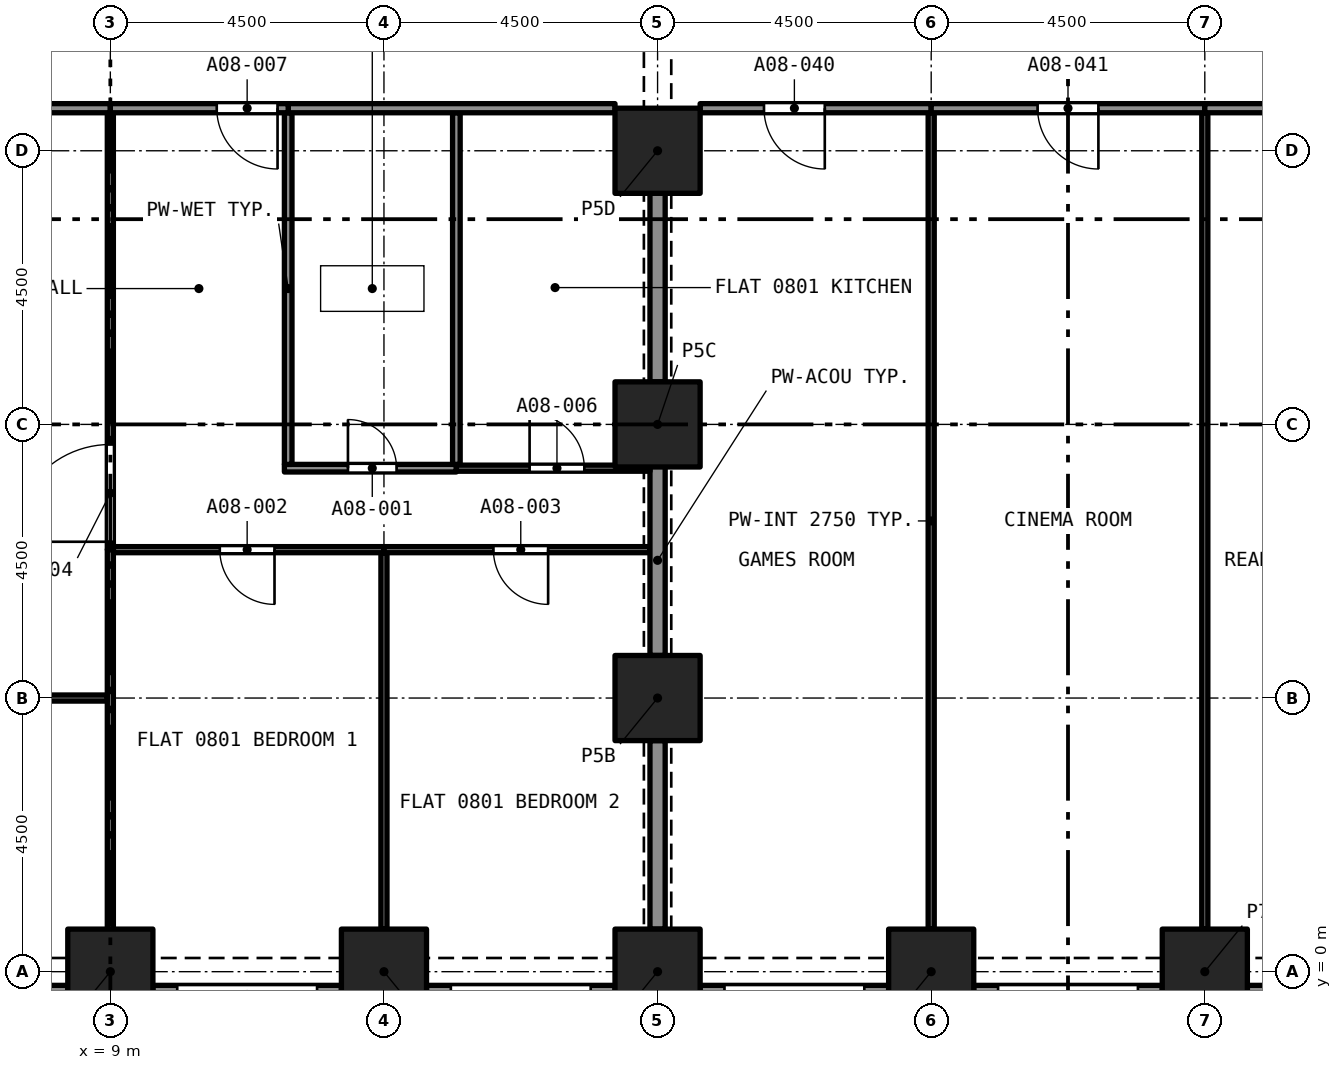
"""IFC4 building model, lengths in metres.
Left out: names, types, materials, properties, quantities, classifications, styles, units other than length and angle.
Written with IfcOpenShell. Run it as: python <this file> out.ifc"""

import sys

from ifc_helpers import new_model, si_unit, direction, frame, frame_2d, origin, origin_2d, place, context, subcontext, project, spatial, rectangle, extrude, element, fill, save


model = new_model("IFC4")
c1 = context("Model", 3, precision=1e-05, world=origin(), true_north=direction((0.0, 1.0)))
c2 = subcontext(c1, "Body", "Model", "MODEL_VIEW")
j1 = project(units=[si_unit("LENGTHUNIT", "METRE"), si_unit("PLANEANGLEUNIT", "RADIAN")], contexts=[c1])
p1 = place(None, origin())
s1 = spatial("IfcSite", under=j1, at=p1, CompositionType="ELEMENT")
p2 = place(p1, origin())
s2 = spatial("IfcBuilding", under=s1, at=p2, CompositionType="ELEMENT")
p3 = place(p2, frame((0.0, 0.0, 36.8)))
s3 = spatial("IfcBuildingStorey", under=s2, at=p3, CompositionType="ELEMENT", Elevation=36.8)
for number, where, z_axis, x_axis in (
    (1, (9.0, 0.0, 0.0), (0.0, 0.0, 1.0), (1.0, 0.0, 0.0)),
    (2, (13.5, 0.0, 0.0), (0.0, 0.0, 1.0), (1.0, 0.0, 0.0)),
    (3, (18.0, 0.0, 0.0), (0.0, 0.0, 1.0), (1.0, 0.0, 0.0)),
    (4, (22.5, 0.0, 0.0), (0.0, 0.0, 1.0), (1.0, 0.0, 0.0)),
    (5, (27.0, 0.0, 0.0), (0.0, 0.0, 1.0), (1.0, 0.0, 0.0)),
    (6, (18.0, 4.5, 0.0), (0.0, 0.0, 1.0), (1.0, 0.0, 0.0)),
    (7, (18.0, 9.0, 0.0), (0.0, 0.0, 1.0), (1.0, 0.0, 0.0)),
    (8, (18.0, 13.5, 0.0), (0.0, 0.0, 1.0), (1.0, 0.0, 0.0)),
):
    element("IfcColumn", number, at=place(p3, frame(where, z_axis=z_axis, x_axis=x_axis)), inside=s3, PredefinedType="COLUMN", context=c2, shape_type="SweptSolid", body=[
        extrude(rectangle(XDim=1.4, YDim=1.4, at=origin_2d()), origin(), (0.0, 0.0, 1.0), 3.2),
    ])
p4 = place(p3, frame((8.3, -0.375, 0.0), z_axis=(0.0, 0.0, 1.0), x_axis=(-1.0, 0.0, 0.0)))
e9 = element("IfcWall", 9, at=p4, inside=s3, PredefinedType="SOLIDWALL", context=c2, shape_type="SweptSolid", body=[
    extrude(rectangle(XDim=3.1, YDim=0.3, at=frame_2d((1.55, 0.0))), origin(), (0.0, 0.0, 1.0), 3.2),
])
p5 = place(p4, frame((0.4, 0.0, 0.45)))
e10 = element("IfcOpeningElement", 10, at=p5, cuts=e9, PredefinedType="OPENING", context=c2, shape_type="SweptSolid", body=[
    extrude(rectangle(XDim=2.3, YDim=1.95, at=frame_2d((1.15, 0.975))), frame((0.0, 0.16, 0.0), z_axis=(0.0, -1.0, 0.0), x_axis=(1.0, 0.0, 0.0)), (0.0, 0.0, 1.0), 0.32),
])
p6 = place(p3, frame((12.8, -0.375, 0.0), z_axis=(0.0, 0.0, 1.0), x_axis=(-1.0, 0.0, 0.0)))
e11 = element("IfcWall", 11, at=p6, inside=s3, PredefinedType="SOLIDWALL", context=c2, shape_type="SweptSolid", body=[
    extrude(rectangle(XDim=3.1, YDim=0.3, at=frame_2d((1.55, 0.0))), origin(), (0.0, 0.0, 1.0), 3.2),
])
p7 = place(p6, frame((0.4, 0.0, 0.45)))
e12 = element("IfcOpeningElement", 12, at=p7, cuts=e11, PredefinedType="OPENING", context=c2, shape_type="SweptSolid", body=[
    extrude(rectangle(XDim=2.3, YDim=1.95, at=frame_2d((1.15, 0.975))), frame((0.0, 0.16, 0.0), z_axis=(0.0, -1.0, 0.0), x_axis=(1.0, 0.0, 0.0)), (0.0, 0.0, 1.0), 0.32),
])
p8 = place(p3, frame((17.3, -0.375, 0.0), z_axis=(0.0, 0.0, 1.0), x_axis=(-1.0, 0.0, 0.0)))
e13 = element("IfcWall", 13, at=p8, inside=s3, PredefinedType="SOLIDWALL", context=c2, shape_type="SweptSolid", body=[
    extrude(rectangle(XDim=3.1, YDim=0.3, at=frame_2d((1.55, 0.0))), origin(), (0.0, 0.0, 1.0), 3.2),
])
p9 = place(p8, frame((0.4, 0.0, 0.45)))
e14 = element("IfcOpeningElement", 14, at=p9, cuts=e13, PredefinedType="OPENING", context=c2, shape_type="SweptSolid", body=[
    extrude(rectangle(XDim=2.3, YDim=1.95, at=frame_2d((1.15, 0.975))), frame((0.0, 0.16, 0.0), z_axis=(0.0, -1.0, 0.0), x_axis=(1.0, 0.0, 0.0)), (0.0, 0.0, 1.0), 0.32),
])
p10 = place(p3, frame((21.8, -0.375, 0.0), z_axis=(0.0, 0.0, 1.0), x_axis=(-1.0, 0.0, 0.0)))
e15 = element("IfcWall", 15, at=p10, inside=s3, PredefinedType="SOLIDWALL", context=c2, shape_type="SweptSolid", body=[
    extrude(rectangle(XDim=3.1, YDim=0.3, at=frame_2d((1.55, 0.0))), origin(), (0.0, 0.0, 1.0), 3.2),
])
p11 = place(p10, frame((0.4, 0.0, 0.45)))
e16 = element("IfcOpeningElement", 16, at=p11, cuts=e15, PredefinedType="OPENING", context=c2, shape_type="SweptSolid", body=[
    extrude(rectangle(XDim=2.3, YDim=1.95, at=frame_2d((1.15, 0.975))), frame((0.0, 0.16, 0.0), z_axis=(0.0, -1.0, 0.0), x_axis=(1.0, 0.0, 0.0)), (0.0, 0.0, 1.0), 0.32),
])
p12 = place(p3, frame((26.3, -0.375, 0.0), z_axis=(0.0, 0.0, 1.0), x_axis=(-1.0, 0.0, 0.0)))
e17 = element("IfcWall", 17, at=p12, inside=s3, PredefinedType="SOLIDWALL", context=c2, shape_type="SweptSolid", body=[
    extrude(rectangle(XDim=3.1, YDim=0.3, at=frame_2d((1.55, 0.0))), origin(), (0.0, 0.0, 1.0), 3.2),
])
p13 = place(p12, frame((0.4, 0.0, 0.45)))
e18 = element("IfcOpeningElement", 18, at=p13, cuts=e17, PredefinedType="OPENING", context=c2, shape_type="SweptSolid", body=[
    extrude(rectangle(XDim=2.3, YDim=1.95, at=frame_2d((1.15, 0.975))), frame((0.0, 0.16, 0.0), z_axis=(0.0, -1.0, 0.0), x_axis=(1.0, 0.0, 0.0)), (0.0, 0.0, 1.0), 0.32),
])
p14 = place(p3, frame((30.8, -0.375, 0.0), z_axis=(0.0, 0.0, 1.0), x_axis=(-1.0, 0.0, 0.0)))
e19 = element("IfcWall", 19, at=p14, inside=s3, PredefinedType="SOLIDWALL", context=c2, shape_type="SweptSolid", body=[
    extrude(rectangle(XDim=3.1, YDim=0.3, at=frame_2d((1.55, 0.0))), origin(), (0.0, 0.0, 1.0), 3.2),
])
p15 = place(p14, frame((0.4, 0.0, 0.45)))
e20 = element("IfcOpeningElement", 20, at=p15, cuts=e19, PredefinedType="OPENING", context=c2, shape_type="SweptSolid", body=[
    extrude(rectangle(XDim=2.3, YDim=1.95, at=frame_2d((1.15, 0.975))), frame((0.0, 0.16, 0.0), z_axis=(0.0, -1.0, 0.0), x_axis=(1.0, 0.0, 0.0)), (0.0, 0.0, 1.0), 0.32),
])
p16 = place(p3, frame((11.863, 8.28, 0.0), z_axis=(0.0, 0.0, 1.0), x_axis=(1.0, 0.0, 0.0)))
e21 = element("IfcWall", 21, at=p16, inside=s3, PredefinedType="PARTITIONING", context=c2, shape_type="SweptSolid", body=[
    extrude(rectangle(XDim=2.828, YDim=0.125, at=frame_2d((1.414, 0.0))), origin(), (0.0, 0.0, 1.0), 2.9),
])
p17 = place(p16, frame((1.045, 0.0, 0.0)))
e22 = element("IfcOpeningElement", 22, at=p17, cuts=e21, PredefinedType="OPENING", context=c2, shape_type="SweptSolid", body=[
    extrude(rectangle(XDim=0.8, YDim=2.1, at=frame_2d((0.4, 1.05))), frame((0.0, 0.073, 0.0), z_axis=(0.0, -1.0, 0.0), x_axis=(1.0, 0.0, 0.0)), (0.0, 0.0, 1.0), 0.145),
])
for number, where, z_axis, x_axis in (
    (23, (11.925, 8.343, 0.0), (0.0, 0.0, 1.0), (0.0, 1.0, 0.0)),
    (24, (14.691, 8.343, 0.0), (0.0, 0.0, 1.0), (0.0, 1.0, 0.0)),
):
    element("IfcWall", number, at=place(p3, frame(where, z_axis=z_axis, x_axis=x_axis)), inside=s3, PredefinedType="PARTITIONING", context=c2, shape_type="SweptSolid", body=[
        extrude(rectangle(XDim=5.782, YDim=0.125, at=frame_2d((2.891, 0.0))), origin(), (0.0, 0.0, 1.0), 2.9),
    ])
p18 = place(p3, frame((11.925, 14.2, 0.0), z_axis=(0.0, 0.0, 1.0), x_axis=(1.0, 0.0, 0.0)))
e25 = element("IfcWall", 25, at=p18, inside=s3, PredefinedType="PARTITIONING", context=c2, shape_type="SweptSolid", body=[
    extrude(rectangle(XDim=5.375, YDim=0.15, at=frame_2d((2.688, 0.0))), origin(), (0.0, 0.0, 1.0), 2.9),
])
p19 = place(p3, frame((13.5, 0.7, 0.0), z_axis=(0.0, 0.0, 1.0), x_axis=(0.0, 1.0, 0.0)))
e26 = element("IfcWall", 26, at=p19, inside=s3, PredefinedType="PARTITIONING", context=c2, shape_type="SweptSolid", body=[
    extrude(rectangle(XDim=6.19, YDim=0.1, at=frame_2d((3.095, 0.0))), origin(), (0.0, 0.0, 1.0), 2.9),
])
p20 = place(p3, frame((13.5, 6.94, 0.0), z_axis=(0.0, 0.0, 1.0), x_axis=(-1.0, 0.0, 0.0)))
e27 = element("IfcWall", 27, at=p20, inside=s3, PredefinedType="PARTITIONING", context=c2, shape_type="SweptSolid", body=[
    extrude(rectangle(XDim=4.45, YDim=0.1, at=frame_2d((2.225, 0.0))), origin(), (0.0, 0.0, 1.0), 2.9),
])
p21 = place(p20, frame((1.8, 0.0, 0.0)))
e28 = element("IfcOpeningElement", 28, at=p21, cuts=e27, PredefinedType="OPENING", context=c2, shape_type="SweptSolid", body=[
    extrude(rectangle(XDim=0.9, YDim=2.1, at=frame_2d((0.45, 1.05))), frame((0.0, 0.06, 0.0), z_axis=(0.0, -1.0, 0.0), x_axis=(1.0, 0.0, 0.0)), (0.0, 0.0, 1.0), 0.12),
])
p22 = place(p3, frame((9.0, 0.7, 0.0), z_axis=(0.0, 0.0, 1.0), x_axis=(0.0, 1.0, 0.0)))
e29 = element("IfcWall", 29, at=p22, inside=s3, PredefinedType="PARTITIONING", context=c2, shape_type="SweptSolid", body=[
    extrude(rectangle(XDim=6.24, YDim=0.1, at=frame_2d((3.12, 0.0))), origin(), (0.0, 0.0, 1.0), 2.9),
])
p23 = place(p3, frame((17.875, 6.94, 0.0), z_axis=(0.0, 0.0, 1.0), x_axis=(-1.0, 0.0, 0.0)))
e30 = element("IfcWall", 30, at=p23, inside=s3, PredefinedType="PARTITIONING", context=c2, shape_type="SweptSolid", body=[
    extrude(rectangle(XDim=4.375, YDim=0.1, at=frame_2d((2.188, 0.0))), origin(), (0.0, 0.0, 1.0), 2.9),
])
p24 = place(p23, frame((1.675, 0.0, 0.0)))
e31 = element("IfcOpeningElement", 31, at=p24, cuts=e30, PredefinedType="OPENING", context=c2, shape_type="SweptSolid", body=[
    extrude(rectangle(XDim=0.9, YDim=2.1, at=frame_2d((0.45, 1.05))), frame((0.0, 0.06, 0.0), z_axis=(0.0, -1.0, 0.0), x_axis=(1.0, 0.0, 0.0)), (0.0, 0.0, 1.0), 0.12),
])
p25 = place(p3, frame((18.0, 5.2, 0.0), z_axis=(0.0, 0.0, 1.0), x_axis=(0.0, 1.0, 0.0)))
e32 = element("IfcWall", 32, at=p25, inside=s3, PredefinedType="PARTITIONING", context=c2, shape_type="SweptSolid", body=[
    extrude(rectangle(XDim=3.13, YDim=0.25, at=frame_2d((1.565, 0.0))), origin(), (0.0, 0.0, 1.0), 2.38),
])
p26 = place(p3, frame((18.0, 0.7, 0.0), z_axis=(0.0, 0.0, 1.0), x_axis=(0.0, 1.0, 0.0)))
e33 = element("IfcWall", 33, at=p26, inside=s3, PredefinedType="PARTITIONING", context=c2, shape_type="SweptSolid", body=[
    extrude(rectangle(XDim=3.1, YDim=0.25, at=frame_2d((1.55, 0.0))), origin(), (0.0, 0.0, 1.0), 2.38),
])
p27 = place(p3, frame((9.0, 6.94, 0.0), z_axis=(0.0, 0.0, 1.0), x_axis=(0.0, 1.0, 0.0)))
e34 = element("IfcWall", 34, at=p27, inside=s3, PredefinedType="PARTITIONING", context=c2, shape_type="SweptSolid", body=[
    extrude(rectangle(XDim=7.185, YDim=0.1, at=frame_2d((3.593, 0.0))), origin(), (0.0, 0.0, 1.0), 2.9),
])
p28 = place(p27, frame((0.13, 0.0, 0.0)))
e35 = element("IfcOpeningElement", 35, at=p28, cuts=e34, PredefinedType="OPENING", context=c2, shape_type="SweptSolid", body=[
    extrude(rectangle(XDim=1.6, YDim=2.1, at=frame_2d((0.8, 1.05))), frame((0.0, 0.06, 0.0), z_axis=(0.0, -1.0, 0.0), x_axis=(1.0, 0.0, 0.0)), (0.0, 0.0, 1.0), 0.12),
])
p29 = place(p3, frame((0.758, 4.5, 0.0), z_axis=(0.0, 0.0, 1.0), x_axis=(1.0, 0.0, 0.0)))
e36 = element("IfcWall", 36, at=p29, inside=s3, PredefinedType="PARTITIONING", context=c2, shape_type="SweptSolid", body=[
    extrude(rectangle(XDim=8.192, YDim=0.1, at=frame_2d((4.096, 0.0))), origin(), (0.0, 0.0, 1.0), 2.9),
])
p30 = place(p29, frame((3.292, 0.0, 0.0)))
e37 = element("IfcOpeningElement", 37, at=p30, cuts=e36, PredefinedType="OPENING", context=c2, shape_type="SweptSolid", body=[
    extrude(rectangle(XDim=1.6, YDim=2.1, at=frame_2d((0.8, 1.05))), frame((0.0, 0.06, 0.0), z_axis=(0.0, -1.0, 0.0), x_axis=(1.0, 0.0, 0.0)), (0.0, 0.0, 1.0), 0.12),
])
p31 = place(p3, frame((0.7, 14.2, 0.0), z_axis=(0.0, 0.0, 1.0), x_axis=(1.0, 0.0, 0.0)))
e38 = element("IfcWall", 38, at=p31, inside=s3, PredefinedType="PARTITIONING", context=c2, shape_type="SweptSolid", body=[
    extrude(rectangle(XDim=8.3, YDim=0.15, at=frame_2d((4.15, 0.0))), origin(), (0.0, 0.0, 1.0), 2.9),
])
p32 = place(p3, frame((14.69, 8.28, 0.0), z_axis=(0.0, 0.0, 1.0), x_axis=(1.0, 0.0, 0.0)))
e39 = element("IfcWall", 39, at=p32, inside=s3, PredefinedType="PARTITIONING", context=c2, shape_type="SweptSolid", body=[
    extrude(rectangle(XDim=3.185, YDim=0.1, at=frame_2d((1.592, 0.0))), origin(), (0.0, 0.0, 1.0), 2.9),
])
p33 = place(p32, frame((1.205, 0.0, 0.0)))
e40 = element("IfcOpeningElement", 40, at=p33, cuts=e39, PredefinedType="OPENING", context=c2, shape_type="SweptSolid", body=[
    extrude(rectangle(XDim=0.9, YDim=2.1, at=frame_2d((0.45, 1.05))), frame((0.0, 0.06, 0.0), z_axis=(0.0, -1.0, 0.0), x_axis=(1.0, 0.0, 0.0)), (0.0, 0.0, 1.0), 0.12),
])
p34 = place(p3, frame((11.925, 14.2, 0.0), z_axis=(0.0, 0.0, 1.0), x_axis=(-1.0, 0.0, 0.0)))
e41 = element("IfcWall", 41, at=p34, inside=s3, PredefinedType="PARTITIONING", context=c2, shape_type="SweptSolid", body=[
    extrude(rectangle(XDim=2.925, YDim=0.15, at=frame_2d((1.462, 0.0))), origin(), (0.0, 0.0, 1.0), 2.9),
])
p35 = place(p34, frame((0.175, 0.0, 0.0)))
e42 = element("IfcOpeningElement", 42, at=p35, cuts=e41, PredefinedType="OPENING", context=c2, shape_type="SweptSolid", body=[
    extrude(rectangle(XDim=1.0, YDim=2.1, at=frame_2d((0.5, 1.05))), frame((0.0, 0.085, 0.0), z_axis=(0.0, -1.0, 0.0), x_axis=(1.0, 0.0, 0.0)), (0.0, 0.0, 1.0), 0.17),
])
p36 = place(p3, frame((18.0, 9.7, 0.0), z_axis=(0.0, 0.0, 1.0), x_axis=(0.0, 1.0, 0.0)))
e43 = element("IfcWall", 43, at=p36, inside=s3, PredefinedType="PARTITIONING", context=c2, shape_type="SweptSolid", body=[
    extrude(rectangle(XDim=3.1, YDim=0.25, at=frame_2d((1.55, 0.0))), origin(), (0.0, 0.0, 1.0), 2.38),
])
p37 = place(p3, frame((22.5, 0.7, 0.0), z_axis=(0.0, 0.0, 1.0), x_axis=(0.0, 1.0, 0.0)))
e44 = element("IfcWall", 44, at=p37, inside=s3, PredefinedType="PARTITIONING", context=c2, shape_type="SweptSolid", body=[
    extrude(rectangle(XDim=13.425, YDim=0.1, at=frame_2d((6.712, 0.0))), origin(), (0.0, 0.0, 1.0), 2.75),
])
p38 = place(p3, frame((22.5, 14.2, 0.0), z_axis=(0.0, 0.0, 1.0), x_axis=(-1.0, 0.0, 0.0)))
e45 = element("IfcWall", 45, at=p38, inside=s3, PredefinedType="PARTITIONING", context=c2, shape_type="SweptSolid", body=[
    extrude(rectangle(XDim=3.8, YDim=0.15, at=frame_2d((1.9, 0.0))), origin(), (0.0, 0.0, 1.0), 2.75),
])
p39 = place(p38, frame((1.75, 0.0, 0.0)))
e46 = element("IfcOpeningElement", 46, at=p39, cuts=e45, PredefinedType="OPENING", context=c2, shape_type="SweptSolid", body=[
    extrude(rectangle(XDim=1.0, YDim=2.1, at=frame_2d((0.5, 1.05))), frame((0.0, 0.085, 0.0), z_axis=(0.0, -1.0, 0.0), x_axis=(1.0, 0.0, 0.0)), (0.0, 0.0, 1.0), 0.17),
])
p40 = place(p3, frame((27.0, 0.7, 0.0), z_axis=(0.0, 0.0, 1.0), x_axis=(0.0, 1.0, 0.0)))
e47 = element("IfcWall", 47, at=p40, inside=s3, PredefinedType="PARTITIONING", context=c2, shape_type="SweptSolid", body=[
    extrude(rectangle(XDim=13.425, YDim=0.1, at=frame_2d((6.712, 0.0))), origin(), (0.0, 0.0, 1.0), 2.75),
])
p41 = place(p3, frame((27.0, 14.2, 0.0), z_axis=(0.0, 0.0, 1.0), x_axis=(-1.0, 0.0, 0.0)))
e48 = element("IfcWall", 48, at=p41, inside=s3, PredefinedType="PARTITIONING", context=c2, shape_type="SweptSolid", body=[
    extrude(rectangle(XDim=4.5, YDim=0.15, at=frame_2d((2.25, 0.0))), origin(), (0.0, 0.0, 1.0), 2.75),
])
p42 = place(p41, frame((1.75, 0.0, 0.0)))
e49 = element("IfcOpeningElement", 49, at=p42, cuts=e48, PredefinedType="OPENING", context=c2, shape_type="SweptSolid", body=[
    extrude(rectangle(XDim=1.0, YDim=2.1, at=frame_2d((0.5, 1.05))), frame((0.0, 0.085, 0.0), z_axis=(0.0, -1.0, 0.0), x_axis=(1.0, 0.0, 0.0)), (0.0, 0.0, 1.0), 0.17),
])
p43 = place(p3, frame((30.8, 14.2, 0.0), z_axis=(0.0, 0.0, 1.0), x_axis=(-1.0, 0.0, 0.0)))
e50 = element("IfcWall", 50, at=p43, inside=s3, PredefinedType="PARTITIONING", context=c2, shape_type="SweptSolid", body=[
    extrude(rectangle(XDim=3.8, YDim=0.15, at=frame_2d((1.9, 0.0))), origin(), (0.0, 0.0, 1.0), 2.75),
])
p44 = place(p43, frame((1.05, 0.0, 0.0)))
e51 = element("IfcOpeningElement", 51, at=p44, cuts=e50, PredefinedType="OPENING", context=c2, shape_type="SweptSolid", body=[
    extrude(rectangle(XDim=1.0, YDim=2.1, at=frame_2d((0.5, 1.05))), frame((0.0, 0.085, 0.0), z_axis=(0.0, -1.0, 0.0), x_axis=(1.0, 0.0, 0.0)), (0.0, 0.0, 1.0), 0.17),
])
p45 = place(p17, origin())
e52 = element("IfcDoor", 52, at=p45, inside=s3, OperationType="SINGLE_SWING_RIGHT", PredefinedType="DOOR", context=c2, shape_type="SweptSolid", body=[
    extrude(rectangle(XDim=0.8, YDim=2.1, at=frame_2d((0.4, 1.05))), frame((0.0, 0.025, 0.0), z_axis=(0.0, -1.0, 0.0), x_axis=(1.0, 0.0, 0.0)), (0.0, 0.0, 1.0), 0.05),
])
fill(e22, e52)
p46 = place(p21, origin())
e53 = element("IfcDoor", 53, at=p46, inside=s3, OperationType="SINGLE_SWING_RIGHT", PredefinedType="DOOR", context=c2, shape_type="SweptSolid", body=[
    extrude(rectangle(XDim=0.9, YDim=2.1, at=frame_2d((0.45, 1.05))), frame((0.0, 0.025, 0.0), z_axis=(0.0, -1.0, 0.0), x_axis=(1.0, 0.0, 0.0)), (0.0, 0.0, 1.0), 0.05),
])
fill(e28, e53)
p47 = place(p24, origin())
e54 = element("IfcDoor", 54, at=p47, inside=s3, OperationType="SINGLE_SWING_LEFT", PredefinedType="DOOR", context=c2, shape_type="SweptSolid", body=[
    extrude(rectangle(XDim=0.9, YDim=2.1, at=frame_2d((0.45, 1.05))), frame((0.0, 0.025, 0.0), z_axis=(0.0, -1.0, 0.0), x_axis=(1.0, 0.0, 0.0)), (0.0, 0.0, 1.0), 0.05),
])
fill(e31, e54)
p48 = place(p28, origin())
e55 = element("IfcDoor", 55, at=p48, inside=s3, OperationType="SINGLE_SWING_LEFT", PredefinedType="DOOR", context=c2, shape_type="SweptSolid", body=[
    extrude(rectangle(XDim=1.6, YDim=2.1, at=frame_2d((0.8, 1.05))), frame((0.0, 0.025, 0.0), z_axis=(0.0, -1.0, 0.0), x_axis=(1.0, 0.0, 0.0)), (0.0, 0.0, 1.0), 0.05),
])
fill(e35, e55)
p49 = place(p33, origin())
e56 = element("IfcDoor", 56, at=p49, inside=s3, OperationType="SINGLE_SWING_RIGHT", PredefinedType="DOOR", context=c2, shape_type="SweptSolid", body=[
    extrude(rectangle(XDim=0.9, YDim=2.1, at=frame_2d((0.45, 1.05))), frame((0.0, 0.025, 0.0), z_axis=(0.0, -1.0, 0.0), x_axis=(1.0, 0.0, 0.0)), (0.0, 0.0, 1.0), 0.05),
])
fill(e40, e56)
p50 = place(p35, origin())
e57 = element("IfcDoor", 57, at=p50, inside=s3, OperationType="SINGLE_SWING_LEFT", PredefinedType="DOOR", context=c2, shape_type="SweptSolid", body=[
    extrude(rectangle(XDim=1.0, YDim=2.1, at=frame_2d((0.5, 1.05))), frame((0.0, 0.025, 0.0), z_axis=(0.0, -1.0, 0.0), x_axis=(1.0, 0.0, 0.0)), (0.0, 0.0, 1.0), 0.05),
])
fill(e42, e57)
p51 = place(p39, origin())
e58 = element("IfcDoor", 58, at=p51, inside=s3, OperationType="SINGLE_SWING_RIGHT", PredefinedType="DOOR", context=c2, shape_type="SweptSolid", body=[
    extrude(rectangle(XDim=1.0, YDim=2.1, at=frame_2d((0.5, 1.05))), frame((0.0, 0.025, 0.0), z_axis=(0.0, -1.0, 0.0), x_axis=(1.0, 0.0, 0.0)), (0.0, 0.0, 1.0), 0.05),
])
fill(e46, e58)
p52 = place(p42, origin())
e59 = element("IfcDoor", 59, at=p52, inside=s3, OperationType="SINGLE_SWING_RIGHT", PredefinedType="DOOR", context=c2, shape_type="SweptSolid", body=[
    extrude(rectangle(XDim=1.0, YDim=2.1, at=frame_2d((0.5, 1.05))), frame((0.0, 0.025, 0.0), z_axis=(0.0, -1.0, 0.0), x_axis=(1.0, 0.0, 0.0)), (0.0, 0.0, 1.0), 0.05),
])
fill(e49, e59)
save(model, sys.argv[1])
